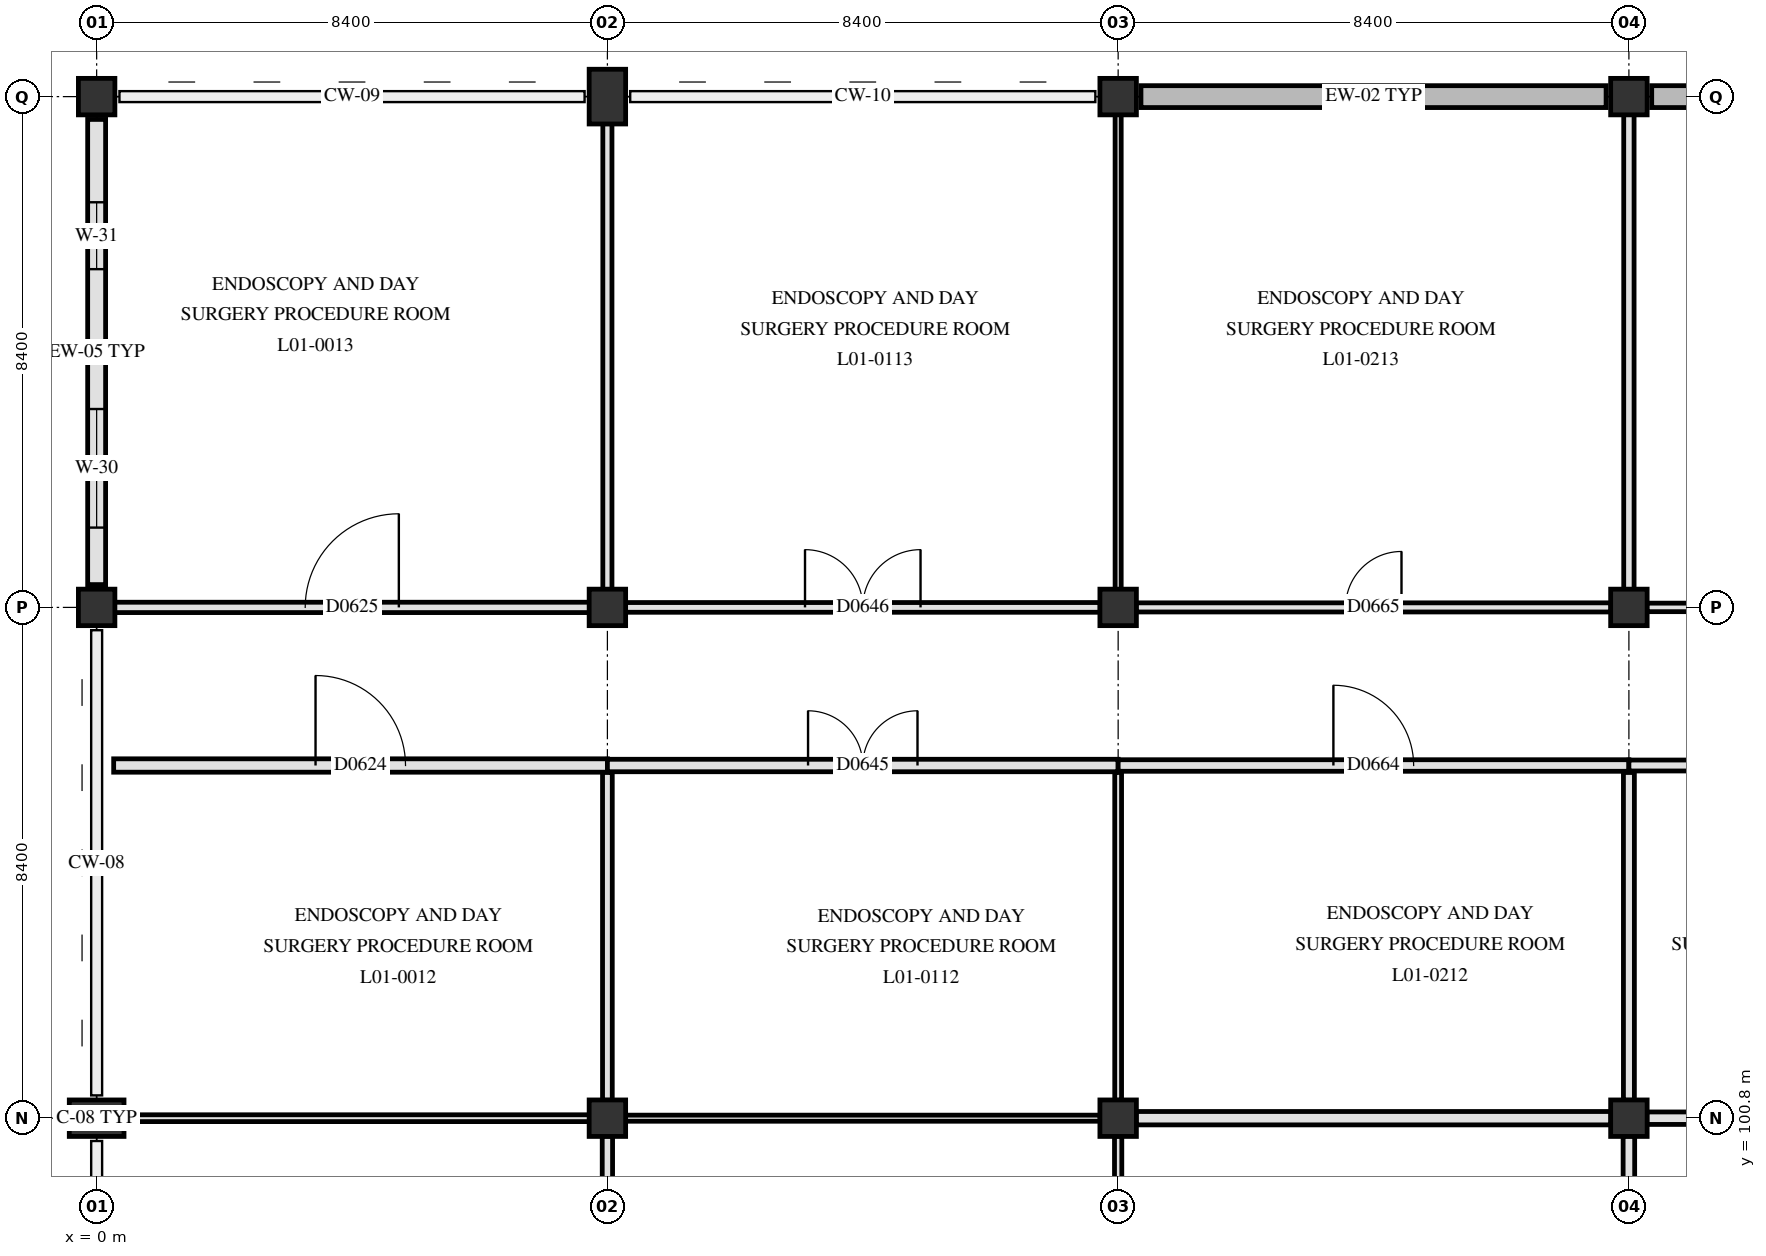
"""IFC4 building model, lengths in metres.
Left out: names, types, materials, properties, quantities, classifications, styles, units other than length and angle.
Written with IfcOpenShell. Run it as: python <this file> out.ifc"""

import sys

from ifc_helpers import new_model, si_unit, direction, frame, frame_2d, origin, origin_2d, place, context, subcontext, project, spatial, rectangle, extrude, element, fill, save


model = new_model("IFC4")
c1 = context("Model", 3, precision=1e-05, world=origin(), true_north=direction((0.0, 1.0)))
c2 = subcontext(c1, "Body", "Model", "MODEL_VIEW")
j1 = project(units=[si_unit("LENGTHUNIT", "METRE"), si_unit("PLANEANGLEUNIT", "RADIAN")], contexts=[c1])
p1 = place(None, origin())
s1 = spatial("IfcSite", under=j1, at=p1, CompositionType="ELEMENT")
p2 = place(p1, origin())
s2 = spatial("IfcBuilding", under=s1, at=p2, CompositionType="ELEMENT")
p3 = place(p2, frame((0.0, 0.0, 4.8)))
s3 = spatial("IfcBuildingStorey", under=s2, at=p3, CompositionType="ELEMENT", Elevation=4.8)
p4 = place(p3, frame((0.0, 100.8, 0.0), z_axis=(0.0, 0.0, 1.0), x_axis=(0.0, 1.0, 0.0)))
e1 = element("IfcColumn", 1, at=p4, inside=s3, PredefinedType="PILASTER", context=c2, shape_type="SweptSolid", body=[
    extrude(rectangle(XDim=0.6, YDim=0.9, at=origin_2d()), origin(), (0.0, 0.0, 1.0), 4.5),
])
for number, where, z_axis, x_axis in (
    (2, (0.0, 109.2, 0.0), (0.0, 0.0, 1.0), (1.0, 0.0, 0.0)),
    (3, (0.0, 117.6, 0.0), (0.0, 0.0, 1.0), (1.0, 0.0, 0.0)),
    (4, (8.4, 100.8, 0.0), (0.0, 0.0, 1.0), (1.0, 0.0, 0.0)),
    (5, (8.4, 109.2, 0.0), (0.0, 0.0, 1.0), (1.0, 0.0, 0.0)),
):
    element("IfcColumn", number, at=place(p3, frame(where, z_axis=z_axis, x_axis=x_axis)), inside=s3, PredefinedType="COLUMN", context=c2, shape_type="SweptSolid", body=[
        extrude(rectangle(XDim=0.6, YDim=0.6, at=origin_2d()), origin(), (0.0, 0.0, 1.0), 4.5),
    ])
p5 = place(p3, frame((8.4, 117.6, 0.0), z_axis=(0.0, 0.0, 1.0), x_axis=(1.0, 0.0, 0.0)))
e6 = element("IfcColumn", 6, at=p5, inside=s3, PredefinedType="PILASTER", context=c2, shape_type="SweptSolid", body=[
    extrude(rectangle(XDim=0.6, YDim=0.9, at=origin_2d()), origin(), (0.0, 0.0, 1.0), 4.5),
])
for number, where, z_axis, x_axis in (
    (7, (16.8, 100.8, 0.0), (0.0, 0.0, 1.0), (1.0, 0.0, 0.0)),
    (8, (16.8, 109.2, 0.0), (0.0, 0.0, 1.0), (1.0, 0.0, 0.0)),
    (9, (16.8, 117.6, 0.0), (0.0, 0.0, 1.0), (1.0, 0.0, 0.0)),
    (10, (25.2, 100.8, 0.0), (0.0, 0.0, 1.0), (1.0, 0.0, 0.0)),
    (11, (25.2, 109.2, 0.0), (0.0, 0.0, 1.0), (1.0, 0.0, 0.0)),
    (12, (25.2, 117.6, 0.0), (0.0, 0.0, 1.0), (1.0, 0.0, 0.0)),
):
    element("IfcColumn", number, at=place(p3, frame(where, z_axis=z_axis, x_axis=x_axis)), inside=s3, PredefinedType="COLUMN", context=c2, shape_type="SweptSolid", body=[
        extrude(rectangle(XDim=0.6, YDim=0.6, at=origin_2d()), origin(), (0.0, 0.0, 1.0), 4.5),
    ])
p6 = place(p3, frame((0.0, 109.575, 0.0), z_axis=(0.0, 0.0, 1.0), x_axis=(0.0, 1.0, 0.0)))
e13 = element("IfcWall", 13, at=p6, inside=s3, PredefinedType="SOLIDWALL", context=c2, shape_type="SweptSolid", body=[
    extrude(rectangle(XDim=7.65, YDim=0.295, at=frame_2d((3.825, 0.0))), origin(), (0.0, 0.0, 1.0), 3.44),
])
p7 = place(p6, frame((0.938, 0.0, 0.85)))
e14 = element("IfcOpeningElement", 14, at=p7, cuts=e13, PredefinedType="OPENING", context=c2, shape_type="SweptSolid", body=[
    extrude(rectangle(XDim=1.95, YDim=1.54, at=frame_2d((0.975, 0.77))), frame((0.0, 0.157, 0.0), z_axis=(0.0, -1.0, 0.0), x_axis=(1.0, 0.0, 0.0)), (0.0, 0.0, 1.0), 0.315),
])
p8 = place(p6, frame((5.188, 0.0, 0.85)))
e15 = element("IfcOpeningElement", 15, at=p8, cuts=e13, PredefinedType="OPENING", context=c2, shape_type="SweptSolid", body=[
    extrude(rectangle(XDim=1.1, YDim=1.66, at=frame_2d((0.55, 0.83))), frame((0.0, 0.157, 0.0), z_axis=(0.0, -1.0, 0.0), x_axis=(1.0, 0.0, 0.0)), (0.0, 0.0, 1.0), 0.315),
])
p9 = place(p3, frame((17.175, 117.6, 0.0), z_axis=(0.0, 0.0, 1.0), x_axis=(1.0, 0.0, 0.0)))
e16 = element("IfcWall", 16, at=p9, inside=s3, PredefinedType="SOLIDWALL", context=c2, shape_type="SweptSolid", body=[
    extrude(rectangle(XDim=7.65, YDim=0.36, at=frame_2d((3.825, 0.0))), origin(), (0.0, 0.0, 1.0), 4.15),
])
p10 = place(p3, frame((25.575, 117.6, 0.0), z_axis=(0.0, 0.0, 1.0), x_axis=(1.0, 0.0, 0.0)))
e17 = element("IfcWall", 17, at=p10, inside=s3, PredefinedType="SOLIDWALL", context=c2, shape_type="SweptSolid", body=[
    extrude(rectangle(XDim=7.65, YDim=0.36, at=frame_2d((3.825, 0.0))), origin(), (0.0, 0.0, 1.0), 4.15),
])
p11 = place(p3, frame((0.295, 100.8, 0.0), z_axis=(0.0, 0.0, 1.0), x_axis=(1.0, 0.0, 0.0)))
e18 = element("IfcWall", 18, at=p11, inside=s3, PredefinedType="PARTITIONING", context=c2, shape_type="SweptSolid", body=[
    extrude(rectangle(XDim=7.81, YDim=0.112, at=frame_2d((3.905, 0.0))), origin(), (0.0, 0.0, 1.0), 3.54),
])
p12 = place(p3, frame((8.695, 100.8, 0.0), z_axis=(0.0, 0.0, 1.0), x_axis=(1.0, 0.0, 0.0)))
e19 = element("IfcWall", 19, at=p12, inside=s3, PredefinedType="PARTITIONING", context=c2, shape_type="SweptSolid", body=[
    extrude(rectangle(XDim=7.81, YDim=0.1, at=frame_2d((3.905, 0.0))), origin(), (0.0, 0.0, 1.0), 3.54),
])
p13 = place(p3, frame((17.095, 100.8, 0.0), z_axis=(0.0, 0.0, 1.0), x_axis=(1.0, 0.0, 0.0)))
e20 = element("IfcWall", 20, at=p13, inside=s3, PredefinedType="PARTITIONING", context=c2, shape_type="SweptSolid", body=[
    extrude(rectangle(XDim=7.81, YDim=0.22, at=frame_2d((3.905, 0.0))), origin(), (0.0, 0.0, 1.0), 3.54),
])
p14 = place(p3, frame((25.495, 100.8, 0.0), z_axis=(0.0, 0.0, 1.0), x_axis=(1.0, 0.0, 0.0)))
e21 = element("IfcWall", 21, at=p14, inside=s3, PredefinedType="PARTITIONING", context=c2, shape_type="SweptSolid", body=[
    extrude(rectangle(XDim=7.81, YDim=0.205, at=frame_2d((3.905, 0.0))), origin(), (0.0, 0.0, 1.0), 3.54),
])
p15 = place(p3, frame((0.28, 106.6, 0.0), z_axis=(0.0, 0.0, 1.0), x_axis=(1.0, 0.0, 0.0)))
e22 = element("IfcWall", 22, at=p15, inside=s3, PredefinedType="PARTITIONING", context=c2, shape_type="SweptSolid", body=[
    extrude(rectangle(XDim=8.12, YDim=0.22, at=frame_2d((4.06, 0.0))), origin(), (0.0, 0.0, 1.0), 3.59),
])
p16 = place(p15, frame((3.32, 0.0, 0.0)))
e23 = element("IfcOpeningElement", 23, at=p16, cuts=e22, PredefinedType="OPENING", context=c2, shape_type="SweptSolid", body=[
    extrude(rectangle(XDim=1.48, YDim=2.22, at=frame_2d((0.74, 1.11))), frame((0.0, 0.12, 0.0), z_axis=(0.0, -1.0, 0.0), x_axis=(1.0, 0.0, 0.0)), (0.0, 0.0, 1.0), 0.24),
])
p17 = place(p3, frame((8.4, 106.6, 0.0), z_axis=(0.0, 0.0, 1.0), x_axis=(1.0, 0.0, 0.0)))
e24 = element("IfcWall", 24, at=p17, inside=s3, PredefinedType="PARTITIONING", context=c2, shape_type="SweptSolid", body=[
    extrude(rectangle(XDim=8.4, YDim=0.205, at=frame_2d((4.2, 0.0))), origin(), (0.0, 0.0, 1.0), 3.59),
])
p18 = place(p17, frame((3.3, 0.0, 0.0)))
e25 = element("IfcOpeningElement", 25, at=p18, cuts=e24, PredefinedType="OPENING", context=c2, shape_type="SweptSolid", body=[
    extrude(rectangle(XDim=1.8, YDim=2.25, at=frame_2d((0.9, 1.125))), frame((0.0, 0.113, 0.0), z_axis=(0.0, -1.0, 0.0), x_axis=(1.0, 0.0, 0.0)), (0.0, 0.0, 1.0), 0.225),
])
p19 = place(p3, frame((16.8, 106.6, 0.0), z_axis=(0.0, 0.0, 1.0), x_axis=(1.0, 0.0, 0.0)))
e26 = element("IfcWall", 26, at=p19, inside=s3, PredefinedType="PARTITIONING", context=c2, shape_type="SweptSolid", body=[
    extrude(rectangle(XDim=8.4, YDim=0.19, at=frame_2d((4.2, 0.0))), origin(), (0.0, 0.0, 1.0), 3.59),
])
p20 = place(p19, frame((3.54, 0.0, 0.0)))
e27 = element("IfcOpeningElement", 27, at=p20, cuts=e26, PredefinedType="OPENING", context=c2, shape_type="SweptSolid", body=[
    extrude(rectangle(XDim=1.32, YDim=2.18, at=frame_2d((0.66, 1.09))), frame((0.0, 0.105, 0.0), z_axis=(0.0, -1.0, 0.0), x_axis=(1.0, 0.0, 0.0)), (0.0, 0.0, 1.0), 0.21),
])
p21 = place(p3, frame((25.2, 106.6, 0.0), z_axis=(0.0, 0.0, 1.0), x_axis=(1.0, 0.0, 0.0)))
e28 = element("IfcWall", 28, at=p21, inside=s3, PredefinedType="PARTITIONING", context=c2, shape_type="SweptSolid", body=[
    extrude(rectangle(XDim=5.95, YDim=0.18, at=frame_2d((2.975, 0.0))), origin(), (0.0, 0.0, 1.0), 3.59),
])
p22 = place(p21, frame((2.45, 0.0, 0.0)))
e29 = element("IfcOpeningElement", 29, at=p22, cuts=e28, PredefinedType="OPENING", context=c2, shape_type="SweptSolid", body=[
    extrude(rectangle(XDim=1.05, YDim=2.15, at=frame_2d((0.525, 1.075))), frame((0.0, 0.1, 0.0), z_axis=(0.0, -1.0, 0.0), x_axis=(1.0, 0.0, 0.0)), (0.0, 0.0, 1.0), 0.2),
])
p23 = place(p3, frame((0.295, 109.2, 0.0), z_axis=(0.0, 0.0, 1.0), x_axis=(1.0, 0.0, 0.0)))
e30 = element("IfcWall", 30, at=p23, inside=s3, PredefinedType="PARTITIONING", context=c2, shape_type="SweptSolid", body=[
    extrude(rectangle(XDim=7.81, YDim=0.17, at=frame_2d((3.905, 0.0))), origin(), (0.0, 0.0, 1.0), 3.54),
])
p24 = place(p23, frame((3.135, 0.0, 0.0)))
e31 = element("IfcOpeningElement", 31, at=p24, cuts=e30, PredefinedType="OPENING", context=c2, shape_type="SweptSolid", body=[
    extrude(rectangle(XDim=1.54, YDim=2.24, at=frame_2d((0.77, 1.12))), frame((0.0, 0.095, 0.0), z_axis=(0.0, -1.0, 0.0), x_axis=(1.0, 0.0, 0.0)), (0.0, 0.0, 1.0), 0.19),
])
p25 = place(p3, frame((8.695, 109.2, 0.0), z_axis=(0.0, 0.0, 1.0), x_axis=(1.0, 0.0, 0.0)))
e32 = element("IfcWall", 32, at=p25, inside=s3, PredefinedType="PARTITIONING", context=c2, shape_type="SweptSolid", body=[
    extrude(rectangle(XDim=7.81, YDim=0.16, at=frame_2d((3.905, 0.0))), origin(), (0.0, 0.0, 1.0), 3.54),
])
p26 = place(p25, frame((2.955, 0.0, 0.0)))
e33 = element("IfcOpeningElement", 33, at=p26, cuts=e32, PredefinedType="OPENING", context=c2, shape_type="SweptSolid", body=[
    extrude(rectangle(XDim=1.9, YDim=2.3, at=frame_2d((0.95, 1.15))), frame((0.0, 0.09, 0.0), z_axis=(0.0, -1.0, 0.0), x_axis=(1.0, 0.0, 0.0)), (0.0, 0.0, 1.0), 0.18),
])
p27 = place(p3, frame((17.095, 109.2, 0.0), z_axis=(0.0, 0.0, 1.0), x_axis=(1.0, 0.0, 0.0)))
e34 = element("IfcWall", 34, at=p27, inside=s3, PredefinedType="PARTITIONING", context=c2, shape_type="SweptSolid", body=[
    extrude(rectangle(XDim=7.81, YDim=0.15, at=frame_2d((3.905, 0.0))), origin(), (0.0, 0.0, 1.0), 3.54),
])
p28 = place(p27, frame((3.445, 0.0, 0.0)))
e35 = element("IfcOpeningElement", 35, at=p28, cuts=e34, PredefinedType="OPENING", context=c2, shape_type="SweptSolid", body=[
    extrude(rectangle(XDim=0.92, YDim=2.08, at=frame_2d((0.46, 1.04))), frame((0.0, 0.085, 0.0), z_axis=(0.0, -1.0, 0.0), x_axis=(1.0, 0.0, 0.0)), (0.0, 0.0, 1.0), 0.17),
])
p29 = place(p3, frame((25.495, 109.2, 0.0), z_axis=(0.0, 0.0, 1.0), x_axis=(1.0, 0.0, 0.0)))
e36 = element("IfcWall", 36, at=p29, inside=s3, PredefinedType="PARTITIONING", context=c2, shape_type="SweptSolid", body=[
    extrude(rectangle(XDim=5.655, YDim=0.14, at=frame_2d((2.827, 0.0))), origin(), (0.0, 0.0, 1.0), 3.54),
])
p30 = place(p29, frame((2.353, 0.0, 0.0)))
e37 = element("IfcOpeningElement", 37, at=p30, cuts=e36, PredefinedType="OPENING", context=c2, shape_type="SweptSolid", body=[
    extrude(rectangle(XDim=0.95, YDim=2.1, at=frame_2d((0.475, 1.05))), frame((0.0, 0.08, 0.0), z_axis=(0.0, -1.0, 0.0), x_axis=(1.0, 0.0, 0.0)), (0.0, 0.0, 1.0), 0.16),
])
p31 = place(p3, frame((8.4, 95.115, 0.0), z_axis=(0.0, 0.0, 1.0), x_axis=(0.0, 1.0, 0.0)))
e38 = element("IfcWall", 38, at=p31, inside=s3, PredefinedType="PARTITIONING", context=c2, shape_type="SweptSolid", body=[
    extrude(rectangle(XDim=5.39, YDim=0.17, at=frame_2d((2.695, 0.0))), origin(), (0.0, 0.0, 1.0), 3.59),
])
p32 = place(p3, frame((8.4, 101.095, 0.0), z_axis=(0.0, 0.0, 1.0), x_axis=(0.0, 1.0, 0.0)))
e39 = element("IfcWall", 39, at=p32, inside=s3, PredefinedType="PARTITIONING", context=c2, shape_type="SweptSolid", body=[
    extrude(rectangle(XDim=5.39, YDim=0.16, at=frame_2d((2.695, 0.0))), origin(), (0.0, 0.0, 1.0), 3.59),
])
p33 = place(p3, frame((8.4, 109.495, 0.0), z_axis=(0.0, 0.0, 1.0), x_axis=(0.0, 1.0, 0.0)))
e40 = element("IfcWall", 40, at=p33, inside=s3, PredefinedType="PARTITIONING", context=c2, shape_type="SweptSolid", body=[
    extrude(rectangle(XDim=7.66, YDim=0.15, at=frame_2d((3.83, 0.0))), origin(), (0.0, 0.0, 1.0), 3.59),
])
p34 = place(p3, frame((16.8, 95.115, 0.0), z_axis=(0.0, 0.0, 1.0), x_axis=(0.0, 1.0, 0.0)))
e41 = element("IfcWall", 41, at=p34, inside=s3, PredefinedType="PARTITIONING", context=c2, shape_type="SweptSolid", body=[
    extrude(rectangle(XDim=5.39, YDim=0.12, at=frame_2d((2.695, 0.0))), origin(), (0.0, 0.0, 1.0), 3.59),
])
p35 = place(p3, frame((16.8, 101.095, 0.0), z_axis=(0.0, 0.0, 1.0), x_axis=(0.0, 1.0, 0.0)))
e42 = element("IfcWall", 42, at=p35, inside=s3, PredefinedType="PARTITIONING", context=c2, shape_type="SweptSolid", body=[
    extrude(rectangle(XDim=5.39, YDim=0.112, at=frame_2d((2.695, 0.0))), origin(), (0.0, 0.0, 1.0), 3.59),
])
p36 = place(p3, frame((16.8, 109.495, 0.0), z_axis=(0.0, 0.0, 1.0), x_axis=(0.0, 1.0, 0.0)))
e43 = element("IfcWall", 43, at=p36, inside=s3, PredefinedType="PARTITIONING", context=c2, shape_type="SweptSolid", body=[
    extrude(rectangle(XDim=7.81, YDim=0.1, at=frame_2d((3.905, 0.0))), origin(), (0.0, 0.0, 1.0), 3.59),
])
p37 = place(p3, frame((25.2, 95.115, 0.0), z_axis=(0.0, 0.0, 1.0), x_axis=(0.0, 1.0, 0.0)))
e44 = element("IfcWall", 44, at=p37, inside=s3, PredefinedType="PARTITIONING", context=c2, shape_type="SweptSolid", body=[
    extrude(rectangle(XDim=5.39, YDim=0.19, at=frame_2d((2.695, 0.0))), origin(), (0.0, 0.0, 1.0), 3.59),
])
p38 = place(p3, frame((25.2, 101.095, 0.0), z_axis=(0.0, 0.0, 1.0), x_axis=(0.0, 1.0, 0.0)))
e45 = element("IfcWall", 45, at=p38, inside=s3, PredefinedType="PARTITIONING", context=c2, shape_type="SweptSolid", body=[
    extrude(rectangle(XDim=5.39, YDim=0.18, at=frame_2d((2.695, 0.0))), origin(), (0.0, 0.0, 1.0), 3.59),
])
p39 = place(p3, frame((25.2, 109.495, 0.0), z_axis=(0.0, 0.0, 1.0), x_axis=(0.0, 1.0, 0.0)))
e46 = element("IfcWall", 46, at=p39, inside=s3, PredefinedType="PARTITIONING", context=c2, shape_type="SweptSolid", body=[
    extrude(rectangle(XDim=7.81, YDim=0.17, at=frame_2d((3.905, 0.0))), origin(), (0.0, 0.0, 1.0), 3.59),
])
p40 = place(p7, origin())
e47 = element("IfcWindow", 47, at=p40, inside=s3, PartitioningType="SINGLE_PANEL", PredefinedType="WINDOW", context=c2, shape_type="SweptSolid", body=[
    extrude(rectangle(XDim=1.95, YDim=1.54, at=frame_2d((0.975, 0.77))), frame((0.0, 0.03, 0.0), z_axis=(0.0, -1.0, 0.0), x_axis=(1.0, 0.0, 0.0)), (0.0, 0.0, 1.0), 0.06),
])
fill(e14, e47)
p41 = place(p8, origin())
e48 = element("IfcWindow", 48, at=p41, inside=s3, PartitioningType="SINGLE_PANEL", PredefinedType="WINDOW", context=c2, shape_type="SweptSolid", body=[
    extrude(rectangle(XDim=1.1, YDim=1.66, at=frame_2d((0.55, 0.83))), frame((0.0, 0.03, 0.0), z_axis=(0.0, -1.0, 0.0), x_axis=(1.0, 0.0, 0.0)), (0.0, 0.0, 1.0), 0.06),
])
fill(e15, e48)
p42 = place(p16, origin())
e49 = element("IfcDoor", 49, at=p42, inside=s3, OperationType="SINGLE_SWING_LEFT", PredefinedType="DOOR", context=c2, shape_type="SweptSolid", body=[
    extrude(rectangle(XDim=1.48, YDim=2.22, at=frame_2d((0.74, 1.11))), frame((0.0, 0.025, 0.0), z_axis=(0.0, -1.0, 0.0), x_axis=(1.0, 0.0, 0.0)), (0.0, 0.0, 1.0), 0.05),
])
fill(e23, e49)
p43 = place(p24, origin())
e50 = element("IfcDoor", 50, at=p43, inside=s3, OperationType="SINGLE_SWING_RIGHT", PredefinedType="DOOR", context=c2, shape_type="SweptSolid", body=[
    extrude(rectangle(XDim=1.54, YDim=2.24, at=frame_2d((0.77, 1.12))), frame((0.0, 0.025, 0.0), z_axis=(0.0, -1.0, 0.0), x_axis=(1.0, 0.0, 0.0)), (0.0, 0.0, 1.0), 0.05),
])
fill(e31, e50)
p44 = place(p18, origin())
e51 = element("IfcDoor", 51, at=p44, inside=s3, OperationType="DOUBLE_SWING_RIGHT", PredefinedType="DOOR", context=c2, shape_type="SweptSolid", body=[
    extrude(rectangle(XDim=1.8, YDim=2.25, at=frame_2d((0.9, 1.125))), frame((0.0, 0.025, 0.0), z_axis=(0.0, -1.0, 0.0), x_axis=(1.0, 0.0, 0.0)), (0.0, 0.0, 1.0), 0.05),
])
fill(e25, e51)
p45 = place(p26, origin())
e52 = element("IfcDoor", 52, at=p45, inside=s3, OperationType="DOUBLE_SWING_LEFT", PredefinedType="DOOR", context=c2, shape_type="SweptSolid", body=[
    extrude(rectangle(XDim=1.9, YDim=2.3, at=frame_2d((0.95, 1.15))), frame((0.0, 0.025, 0.0), z_axis=(0.0, -1.0, 0.0), x_axis=(1.0, 0.0, 0.0)), (0.0, 0.0, 1.0), 0.05),
])
fill(e33, e52)
p46 = place(p20, origin())
e53 = element("IfcDoor", 53, at=p46, inside=s3, OperationType="SINGLE_SWING_LEFT", PredefinedType="DOOR", context=c2, shape_type="SweptSolid", body=[
    extrude(rectangle(XDim=1.32, YDim=2.18, at=frame_2d((0.66, 1.09))), frame((0.0, 0.025, 0.0), z_axis=(0.0, -1.0, 0.0), x_axis=(1.0, 0.0, 0.0)), (0.0, 0.0, 1.0), 0.05),
])
fill(e27, e53)
p47 = place(p28, origin())
e54 = element("IfcDoor", 54, at=p47, inside=s3, OperationType="SINGLE_SWING_RIGHT", PredefinedType="DOOR", context=c2, shape_type="SweptSolid", body=[
    extrude(rectangle(XDim=0.92, YDim=2.08, at=frame_2d((0.46, 1.04))), frame((0.0, 0.025, 0.0), z_axis=(0.0, -1.0, 0.0), x_axis=(1.0, 0.0, 0.0)), (0.0, 0.0, 1.0), 0.05),
])
fill(e35, e54)
save(model, sys.argv[1])
